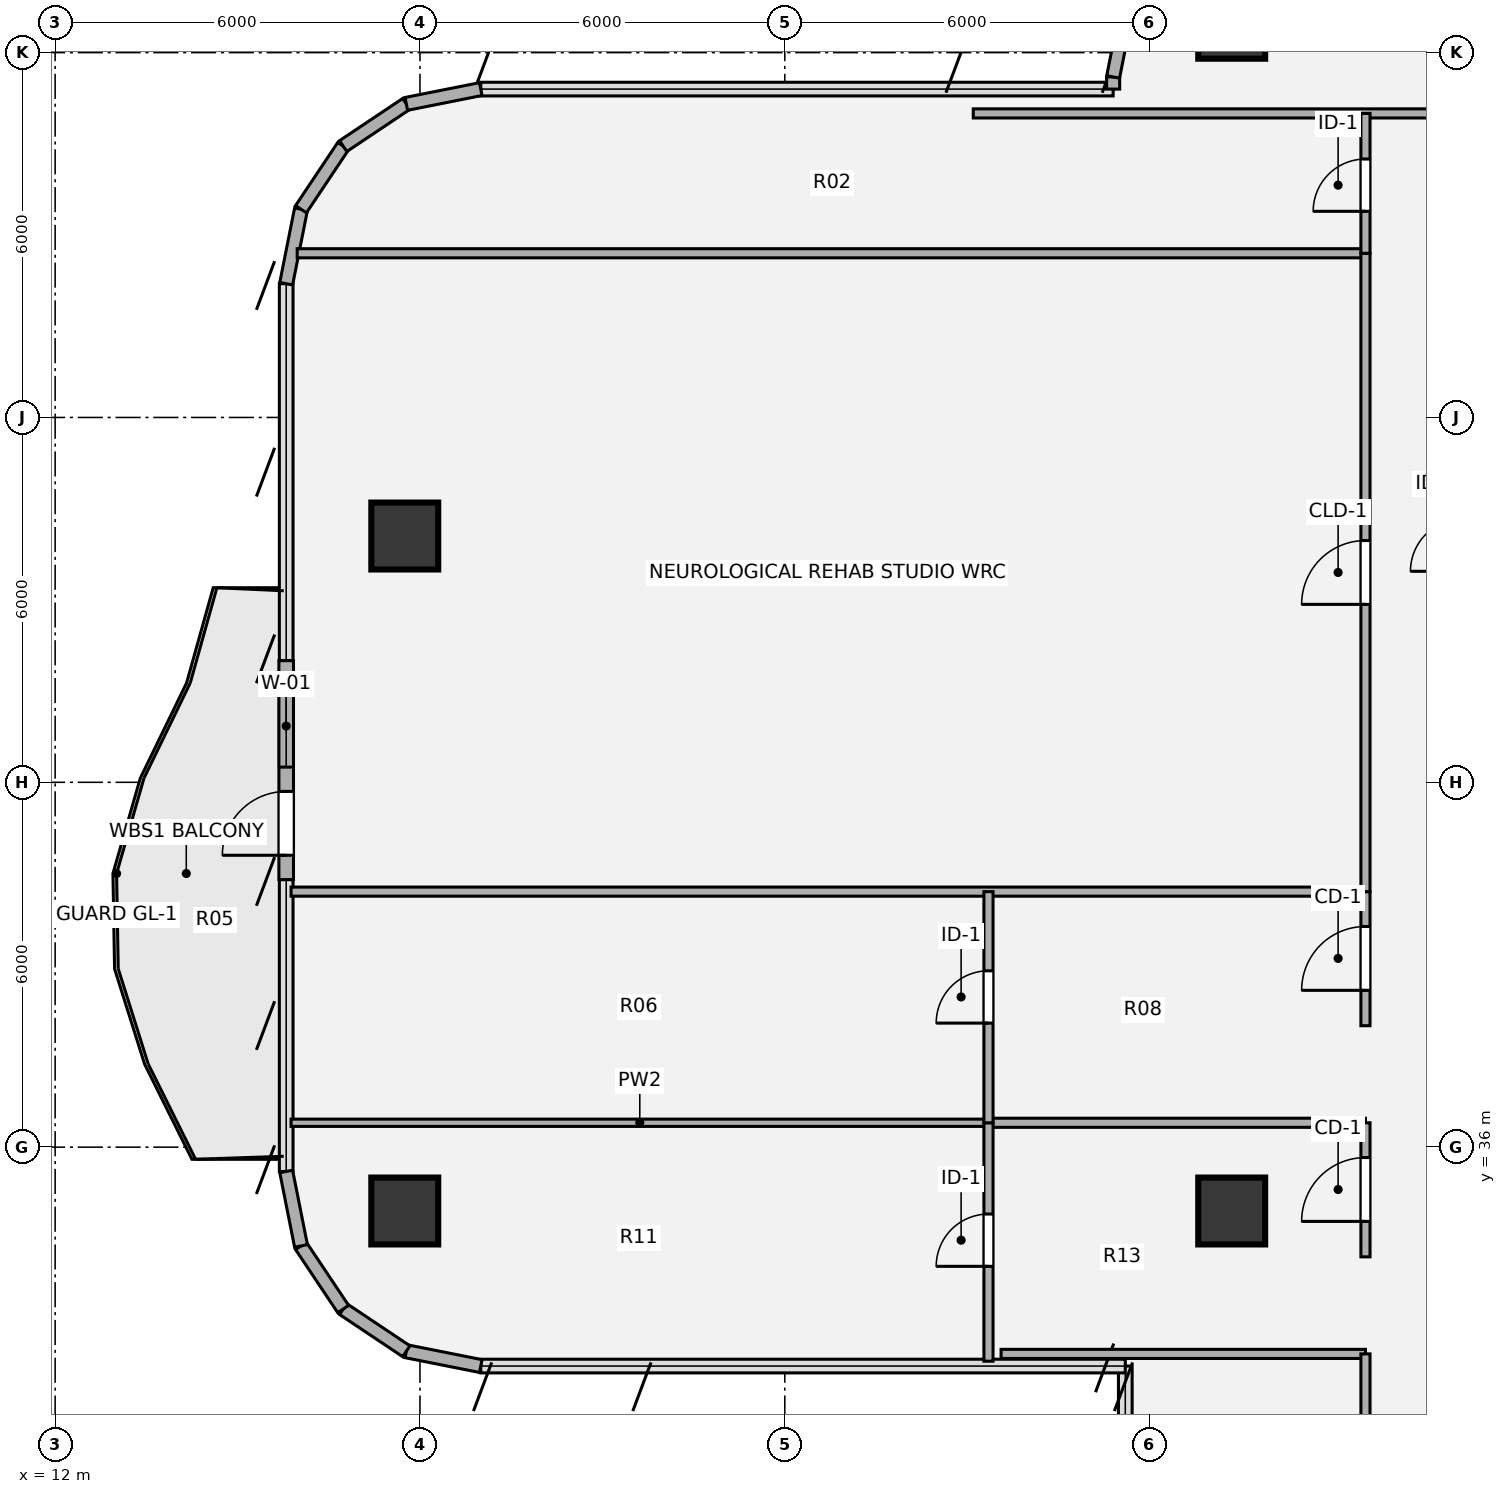
"""IFC4 building model, lengths in metres.
Left out: names, types, materials, properties, quantities, classifications, styles, units other than length and angle.
Written with IfcOpenShell. Run it as: python <this file> out.ifc"""

import sys

from ifc_helpers import new_model, si_unit, direction, frame, frame_2d, origin, origin_2d, place, context, subcontext, project, spatial, rectangle, hollow_circle, extrude, source, transform, mapped, element, fill, save


model = new_model("IFC4")
c1 = context("Model", 3, precision=1e-05, world=origin(), true_north=direction((0.0, 1.0)))
c2 = subcontext(c1, "Body", "Model", "MODEL_VIEW")
j1 = project(units=[si_unit("LENGTHUNIT", "METRE"), si_unit("PLANEANGLEUNIT", "RADIAN")], contexts=[c1])
p1 = place(None, origin())
s1 = spatial("IfcSite", under=j1, at=p1, CompositionType="ELEMENT")
p2 = place(p1, origin())
s2 = spatial("IfcBuilding", under=s1, at=p2, CompositionType="ELEMENT")
p3 = place(p2, frame((0.0, 0.0, 182.88)))
s3 = spatial("IfcBuildingStorey", under=s2, at=p3, CompositionType="ELEMENT", Elevation=182.88)
m1 = source(origin(), c2, "Body", "SweptSolid", [
    extrude(hollow_circle(Radius=0.55, WallThickness=0.04, at=origin_2d()), origin(), (0.0, 0.0, 1.0), 3.78),
])
for number, where, z_axis, x_axis in (
    (1, (17.75, 34.95, 0.0), (0.0, 0.0, 1.0), (1.0, 0.0, 0.0)),
    (2, (17.75, 46.05, 0.0), (0.0, 0.0, 1.0), (1.0, 0.0, 0.0)),
    (3, (31.35, 34.95, 0.0), (0.0, 0.0, 1.0), (1.0, 0.0, 0.0)),
    (4, (31.35, 54.45, 0.0), (0.0, 0.0, 1.0), (1.0, 0.0, 0.0)),
):
    element("IfcColumn", number, at=place(p3, frame(where, z_axis=z_axis, x_axis=x_axis)), inside=s3, PredefinedType="COLUMN", context=c2, shape_type="MappedRepresentation", body=[
        mapped(m1, transform((0.0, 0.0, 0.0), x_axis=(1.0, 0.0, 0.0), y_axis=(0.0, 1.0, 0.0), z_axis=(0.0, 0.0, 1.0), scale=1.0)),
    ])
for number, where, z_axis, x_axis in (
    (5, (19.0, 32.4, 0.0), (0.0, 0.0, 1.0), (-0.981, 0.195, 0.0)),
    (6, (17.775, 32.644, 0.0), (0.0, 0.0, 1.0), (-0.831, 0.556, 0.0)),
    (7, (16.737, 33.337, 0.0), (0.0, 0.0, 1.0), (-0.556, 0.831, 0.0)),
    (8, (16.044, 34.375, 0.0), (0.0, 0.0, 1.0), (-0.195, 0.981, 0.0)),
):
    element("IfcWall", number, at=place(p3, frame(where, z_axis=z_axis, x_axis=x_axis)), inside=s3, PredefinedType="SOLIDWALL", context=c2, shape_type="SweptSolid", body=[
        extrude(rectangle(XDim=1.249, YDim=0.215, at=frame_2d((0.624, 0.0))), origin(), (0.0, 0.0, 1.0), 3.53),
    ])
p4 = place(p3, frame((15.8, 40.4, 0.0), z_axis=(0.0, 0.0, 1.0), x_axis=(0.0, 1.0, 0.0)))
e9 = element("IfcWall", 9, at=p4, inside=s3, PredefinedType="SOLIDWALL", context=c2, shape_type="SweptSolid", body=[
    extrude(rectangle(XDim=3.6, YDim=0.24, at=frame_2d((1.8, 0.0))), origin(), (0.0, 0.0, 1.0), 3.53),
])
p5 = place(p4, frame((0.4, 0.0, 0.0)))
e10 = element("IfcOpeningElement", 10, at=p5, cuts=e9, PredefinedType="OPENING", context=c2, shape_type="SweptSolid", body=[
    extrude(rectangle(XDim=1.05, YDim=2.15, at=origin_2d()), frame((0.525, 0.13, 1.075), z_axis=(0.0, -1.0, 0.0), x_axis=(1.0, 0.0, 0.0)), (0.0, 0.0, 1.0), 0.26),
])
p6 = place(p4, frame((1.85, 0.0, 0.85)))
e11 = element("IfcOpeningElement", 11, at=p6, cuts=e9, PredefinedType="OPENING", context=c2, shape_type="SweptSolid", body=[
    extrude(rectangle(XDim=1.35, YDim=1.35, at=origin_2d()), frame((0.675, 0.13, 0.675), z_axis=(0.0, -1.0, 0.0), x_axis=(1.0, 0.0, 0.0)), (0.0, 0.0, 1.0), 0.26),
])
for number, where, z_axis, x_axis in (
    (12, (15.8, 50.2, 0.0), (0.0, 0.0, 1.0), (0.195, 0.981, 0.0)),
    (13, (16.044, 51.425, 0.0), (0.0, 0.0, 1.0), (0.556, 0.831, 0.0)),
    (14, (16.737, 52.463, 0.0), (0.0, 0.0, 1.0), (0.831, 0.556, 0.0)),
    (15, (17.775, 53.156, 0.0), (0.0, 0.0, 1.0), (0.981, 0.195, 0.0)),
):
    element("IfcWall", number, at=place(p3, frame(where, z_axis=z_axis, x_axis=x_axis)), inside=s3, PredefinedType="SOLIDWALL", context=c2, shape_type="SweptSolid", body=[
        extrude(rectangle(XDim=1.249, YDim=0.215, at=frame_2d((0.624, 0.0))), origin(), (0.0, 0.0, 1.0), 3.53),
    ])
p7 = place(p3, frame((29.4, 53.4, 0.0), z_axis=(0.0, 0.0, 1.0), x_axis=(0.0, 1.0, 0.0)))
e16 = element("IfcWall", 16, at=p7, inside=s3, PredefinedType="SOLIDWALL", context=c2, shape_type="SweptSolid", body=[
    extrude(rectangle(XDim=0.2, YDim=0.215, at=frame_2d((0.1, 0.0))), origin(), (0.0, 0.0, 1.0), 3.53),
])
p8 = place(p3, frame((29.4, 53.6, 0.0), z_axis=(0.0, 0.0, 1.0), x_axis=(0.195127417394, 0.980777900945, 0.0)))
e17 = element("IfcWall", 17, at=p8, inside=s3, PredefinedType="SOLIDWALL", context=c2, shape_type="SweptSolid", body=[
    extrude(rectangle(XDim=1.092, YDim=0.215, at=frame_2d((0.546, 0.0))), origin(), (0.0, 0.0, 1.0), 3.53),
])
p9 = place(p3, frame((27.557, 32.6, 0.0), z_axis=(0.0, 0.0, 1.0), x_axis=(1.0, 0.0, 0.0)))
e18 = element("IfcWall", 18, at=p9, inside=s3, PredefinedType="PARTITIONING", context=c2, shape_type="SweptSolid", body=[
    extrude(rectangle(XDim=5.993, YDim=0.15, at=frame_2d((2.997, 0.0))), origin(), (0.0, 0.0, 1.0), 3.5),
])
p10 = place(p3, frame((15.88, 36.401, 0.0), z_axis=(0.0, 0.0, 1.0), x_axis=(1.0, 0.0, 0.0)))
e19 = element("IfcWall", 19, at=p10, inside=s3, PredefinedType="PARTITIONING", context=c2, shape_type="SweptSolid", body=[
    extrude(rectangle(XDim=11.47, YDim=0.12, at=frame_2d((5.735, 0.0))), origin(), (0.0, 0.0, 1.0), 2.982),
])
p11 = place(p3, frame((27.35, 36.401, 0.0), z_axis=(0.0, 0.0, 1.0), x_axis=(1.0, 0.0, 0.0)))
e20 = element("IfcWall", 20, at=p11, inside=s3, PredefinedType="PARTITIONING", context=c2, shape_type="SweptSolid", body=[
    extrude(rectangle(XDim=6.2, YDim=0.15, at=frame_2d((3.1, 0.0))), origin(), (0.0, 0.0, 1.0), 2.982),
])
p12 = place(p3, frame((15.88, 40.202, 0.0), z_axis=(0.0, 0.0, 1.0), x_axis=(1.0, 0.0, 0.0)))
e21 = element("IfcWall", 21, at=p12, inside=s3, PredefinedType="PARTITIONING", context=c2, shape_type="SweptSolid", body=[
    extrude(rectangle(XDim=17.67, YDim=0.15, at=frame_2d((8.835, 0.0))), origin(), (0.0, 0.0, 1.0), 2.982),
])
p13 = place(p3, frame((15.981, 50.7, 0.0), z_axis=(0.0, 0.0, 1.0), x_axis=(1.0, 0.0, 0.0)))
e22 = element("IfcWall", 22, at=p13, inside=s3, PredefinedType="PARTITIONING", context=c2, shape_type="SweptSolid", body=[
    extrude(rectangle(XDim=17.569, YDim=0.15, at=frame_2d((8.785, 0.0))), origin(), (0.0, 0.0, 1.0), 3.308),
])
p14 = place(p3, frame((27.1, 53.0, 0.0), z_axis=(0.0, 0.0, 1.0), x_axis=(1.0, 0.0, 0.0)))
e23 = element("IfcWall", 23, at=p14, inside=s3, PredefinedType="PARTITIONING", context=c2, shape_type="SweptSolid", body=[
    extrude(rectangle(XDim=17.8, YDim=0.15, at=frame_2d((8.9, 0.0))), origin(), (0.0, 0.0, 1.0), 3.308),
])
p15 = place(p14, frame((8.375, 0.0, 0.0)))
e24 = element("IfcOpeningElement", 24, at=p15, cuts=e23, PredefinedType="OPENING", context=c2, shape_type="SweptSolid", body=[
    extrude(rectangle(XDim=1.05, YDim=2.1, at=origin_2d()), frame((0.525, 0.085, 1.05), z_axis=(0.0, -1.0, 0.0), x_axis=(1.0, 0.0, 0.0)), (0.0, 0.0, 1.0), 0.17),
])
p16 = place(p3, frame((27.35, 32.48, 0.0), z_axis=(0.0, 0.0, 1.0), x_axis=(0.0, 1.0, 0.0)))
e25 = element("IfcWall", 25, at=p16, inside=s3, PredefinedType="PARTITIONING", context=c2, shape_type="SweptSolid", body=[
    extrude(rectangle(XDim=3.921, YDim=0.15, at=frame_2d((1.96, 0.0))), origin(), (0.0, 0.0, 1.0), 3.5),
])
p17 = place(p16, frame((1.56, 0.0, 0.0)))
e26 = element("IfcOpeningElement", 26, at=p17, cuts=e25, PredefinedType="OPENING", context=c2, shape_type="SweptSolid", body=[
    extrude(rectangle(XDim=0.86, YDim=2.1, at=origin_2d()), frame((0.43, 0.085, 1.05), z_axis=(0.0, -1.0, 0.0), x_axis=(1.0, 0.0, 0.0)), (0.0, 0.0, 1.0), 0.17),
])
p18 = place(p3, frame((27.35, 36.401, 0.0), z_axis=(0.0, 0.0, 1.0), x_axis=(0.0, 1.0, 0.0)))
e27 = element("IfcWall", 27, at=p18, inside=s3, PredefinedType="PARTITIONING", context=c2, shape_type="SweptSolid", body=[
    extrude(rectangle(XDim=3.801, YDim=0.15, at=frame_2d((1.9, 0.0))), origin(), (0.0, 0.0, 1.0), 3.5),
])
p19 = place(p18, frame((1.639, 0.0, 0.0)))
e28 = element("IfcOpeningElement", 28, at=p19, cuts=e27, PredefinedType="OPENING", context=c2, shape_type="SweptSolid", body=[
    extrude(rectangle(XDim=0.86, YDim=2.1, at=origin_2d()), frame((0.43, 0.085, 1.05), z_axis=(0.0, -1.0, 0.0), x_axis=(1.0, 0.0, 0.0)), (0.0, 0.0, 1.0), 0.17),
])
p20 = place(p3, frame((33.55, 21.2, 0.0), z_axis=(0.0, 0.0, 1.0), x_axis=(0.0, 1.0, 0.0)))
e29 = element("IfcWall", 29, at=p20, inside=s3, PredefinedType="PARTITIONING", context=c2, shape_type="SweptSolid", body=[
    extrude(rectangle(XDim=11.4, YDim=0.15, at=frame_2d((5.7, 0.0))), origin(), (0.0, 0.0, 1.0), 3.5),
])
p21 = place(p20, frame((5.14, 0.0, 0.0)))
e30 = element("IfcOpeningElement", 30, at=p21, cuts=e29, PredefinedType="OPENING", context=c2, shape_type="SweptSolid", body=[
    extrude(rectangle(XDim=0.86, YDim=2.1, at=origin_2d()), frame((0.43, 0.085, 1.05), z_axis=(0.0, -1.0, 0.0), x_axis=(1.0, 0.0, 0.0)), (0.0, 0.0, 1.0), 0.17),
])
p22 = place(p3, frame((33.55, 34.196, 0.0), z_axis=(0.0, 0.0, 1.0), x_axis=(0.0, 1.0, 0.0)))
e31 = element("IfcWall", 31, at=p22, inside=s3, PredefinedType="PARTITIONING", context=c2, shape_type="SweptSolid", body=[
    extrude(rectangle(XDim=2.205, YDim=0.15, at=frame_2d((1.103, 0.0))), origin(), (0.0, 0.0, 1.0), 3.5),
])
p23 = place(p22, frame((0.583, 0.0, 0.0)))
e32 = element("IfcOpeningElement", 32, at=p23, cuts=e31, PredefinedType="OPENING", context=c2, shape_type="SweptSolid", body=[
    extrude(rectangle(XDim=1.05, YDim=2.1, at=origin_2d()), frame((0.525, 0.085, 1.05), z_axis=(0.0, -1.0, 0.0), x_axis=(1.0, 0.0, 0.0)), (0.0, 0.0, 1.0), 0.17),
])
p24 = place(p3, frame((33.55, 37.997, 0.0), z_axis=(0.0, 0.0, 1.0), x_axis=(0.0, 1.0, 0.0)))
e33 = element("IfcWall", 33, at=p24, inside=s3, PredefinedType="PARTITIONING", context=c2, shape_type="SweptSolid", body=[
    extrude(rectangle(XDim=2.205, YDim=0.15, at=frame_2d((1.103, 0.0))), origin(), (0.0, 0.0, 1.0), 3.5),
])
p25 = place(p24, frame((0.582, 0.0, 0.0)))
e34 = element("IfcOpeningElement", 34, at=p25, cuts=e33, PredefinedType="OPENING", context=c2, shape_type="SweptSolid", body=[
    extrude(rectangle(XDim=1.05, YDim=2.1, at=origin_2d()), frame((0.525, 0.085, 1.05), z_axis=(0.0, -1.0, 0.0), x_axis=(1.0, 0.0, 0.0)), (0.0, 0.0, 1.0), 0.17),
])
p26 = place(p3, frame((33.55, 40.202, 0.0), z_axis=(0.0, 0.0, 1.0), x_axis=(0.0, 1.0, 0.0)))
e35 = element("IfcWall", 35, at=p26, inside=s3, PredefinedType="PARTITIONING", context=c2, shape_type="SweptSolid", body=[
    extrude(rectangle(XDim=10.498, YDim=0.15, at=frame_2d((5.249, 0.0))), origin(), (0.0, 0.0, 1.0), 3.5),
])
p27 = place(p26, frame((4.724, 0.0, 0.0)))
e36 = element("IfcOpeningElement", 36, at=p27, cuts=e35, PredefinedType="OPENING", context=c2, shape_type="SweptSolid", body=[
    extrude(rectangle(XDim=1.05, YDim=2.1, at=origin_2d()), frame((0.525, 0.085, 1.05), z_axis=(0.0, -1.0, 0.0), x_axis=(1.0, 0.0, 0.0)), (0.0, 0.0, 1.0), 0.17),
])
p28 = place(p3, frame((33.55, 50.7, 0.0), z_axis=(0.0, 0.0, 1.0), x_axis=(0.0, 1.0, 0.0)))
e37 = element("IfcWall", 37, at=p28, inside=s3, PredefinedType="PARTITIONING", context=c2, shape_type="SweptSolid", body=[
    extrude(rectangle(XDim=2.3, YDim=0.15, at=frame_2d((1.15, 0.0))), origin(), (0.0, 0.0, 1.0), 3.5),
])
p29 = place(p28, frame((0.69, 0.0, 0.0)))
e38 = element("IfcOpeningElement", 38, at=p29, cuts=e37, PredefinedType="OPENING", context=c2, shape_type="SweptSolid", body=[
    extrude(rectangle(XDim=0.86, YDim=2.1, at=origin_2d()), frame((0.43, 0.085, 1.05), z_axis=(0.0, -1.0, 0.0), x_axis=(1.0, 0.0, 0.0)), (0.0, 0.0, 1.0), 0.17),
])
m2 = source(origin(), c2, "Body", "SweptSolid", [
    extrude(rectangle(XDim=1.05, YDim=2.15, at=origin_2d()), frame((0.525, 0.025, 1.075), z_axis=(0.0, -1.0, 0.0), x_axis=(1.0, 0.0, 0.0)), (0.0, 0.0, 1.0), 0.05),
])
p30 = place(p5, origin())
e39 = element("IfcDoor", 39, at=p30, inside=s3, OperationType="SINGLE_SWING_LEFT", PredefinedType="DOOR", context=c2, shape_type="MappedRepresentation", body=[
    mapped(m2, transform((0.0, 0.0, 0.0), x_axis=(1.0, 0.0, 0.0), y_axis=(0.0, 1.0, 0.0), z_axis=(0.0, 0.0, 1.0), scale=1.0)),
])
fill(e10, e39)
m3 = source(origin(), c2, "Body", "SweptSolid", [
    extrude(rectangle(XDim=1.35, YDim=1.35, at=origin_2d()), frame((0.675, 0.03, 0.675), z_axis=(0.0, -1.0, 0.0), x_axis=(1.0, 0.0, 0.0)), (0.0, 0.0, 1.0), 0.06),
])
p31 = place(p6, origin())
e40 = element("IfcWindow", 40, at=p31, inside=s3, PartitioningType="SINGLE_PANEL", PredefinedType="WINDOW", context=c2, shape_type="MappedRepresentation", body=[
    mapped(m3, transform((0.0, 0.0, 0.0), x_axis=(1.0, 0.0, 0.0), y_axis=(0.0, 1.0, 0.0), z_axis=(0.0, 0.0, 1.0), scale=1.0)),
])
fill(e11, e40)
m4 = source(origin(), c2, "Body", "SweptSolid", [
    extrude(rectangle(XDim=0.86, YDim=2.1, at=origin_2d()), frame((0.43, 0.025, 1.05), z_axis=(0.0, -1.0, 0.0), x_axis=(1.0, 0.0, 0.0)), (0.0, 0.0, 1.0), 0.05),
])
p32 = place(p17, origin())
e41 = element("IfcDoor", 41, at=p32, inside=s3, OperationType="SINGLE_SWING_LEFT", PredefinedType="DOOR", context=c2, shape_type="MappedRepresentation", body=[
    mapped(m4, transform((0.0, 0.0, 0.0), x_axis=(1.0, 0.0, 0.0), y_axis=(0.0, 1.0, 0.0), z_axis=(0.0, 0.0, 1.0), scale=1.0)),
])
fill(e26, e41)
p33 = place(p19, origin())
e42 = element("IfcDoor", 42, at=p33, inside=s3, OperationType="SINGLE_SWING_LEFT", PredefinedType="DOOR", context=c2, shape_type="MappedRepresentation", body=[
    mapped(m4, transform((0.0, 0.0, 0.0), x_axis=(1.0, 0.0, 0.0), y_axis=(0.0, 1.0, 0.0), z_axis=(0.0, 0.0, 1.0), scale=1.0)),
])
fill(e28, e42)
m5 = source(origin(), c2, "Body", "SweptSolid", [
    extrude(rectangle(XDim=1.05, YDim=2.1, at=origin_2d()), frame((0.525, 0.025, 1.05), z_axis=(0.0, -1.0, 0.0), x_axis=(1.0, 0.0, 0.0)), (0.0, 0.0, 1.0), 0.05),
])
p34 = place(p23, origin())
e43 = element("IfcDoor", 43, at=p34, inside=s3, OperationType="SINGLE_SWING_LEFT", PredefinedType="DOOR", context=c2, shape_type="MappedRepresentation", body=[
    mapped(m5, transform((0.0, 0.0, 0.0), x_axis=(1.0, 0.0, 0.0), y_axis=(0.0, 1.0, 0.0), z_axis=(0.0, 0.0, 1.0), scale=1.0)),
])
fill(e32, e43)
p35 = place(p25, origin())
e44 = element("IfcDoor", 44, at=p35, inside=s3, OperationType="SINGLE_SWING_LEFT", PredefinedType="DOOR", context=c2, shape_type="MappedRepresentation", body=[
    mapped(m5, transform((0.0, 0.0, 0.0), x_axis=(1.0, 0.0, 0.0), y_axis=(0.0, 1.0, 0.0), z_axis=(0.0, 0.0, 1.0), scale=1.0)),
])
fill(e34, e44)
m6 = source(origin(), c2, "Body", "SweptSolid", [
    extrude(rectangle(XDim=1.05, YDim=2.1, at=origin_2d()), frame((0.525, 0.025, 1.05), z_axis=(0.0, -1.0, 0.0), x_axis=(1.0, 0.0, 0.0)), (0.0, 0.0, 1.0), 0.05),
])
p36 = place(p27, origin())
e45 = element("IfcDoor", 45, at=p36, inside=s3, OperationType="SINGLE_SWING_LEFT", PredefinedType="DOOR", context=c2, shape_type="MappedRepresentation", body=[
    mapped(m6, transform((0.0, 0.0, 0.0), x_axis=(1.0, 0.0, 0.0), y_axis=(0.0, 1.0, 0.0), z_axis=(0.0, 0.0, 1.0), scale=1.0)),
])
fill(e36, e45)
p37 = place(p29, origin())
e46 = element("IfcDoor", 46, at=p37, inside=s3, OperationType="SINGLE_SWING_LEFT", PredefinedType="DOOR", context=c2, shape_type="MappedRepresentation", body=[
    mapped(m4, transform((0.0, 0.0, 0.0), x_axis=(1.0, 0.0, 0.0), y_axis=(0.0, 1.0, 0.0), z_axis=(0.0, 0.0, 1.0), scale=1.0)),
])
fill(e38, e46)
save(model, sys.argv[1])
